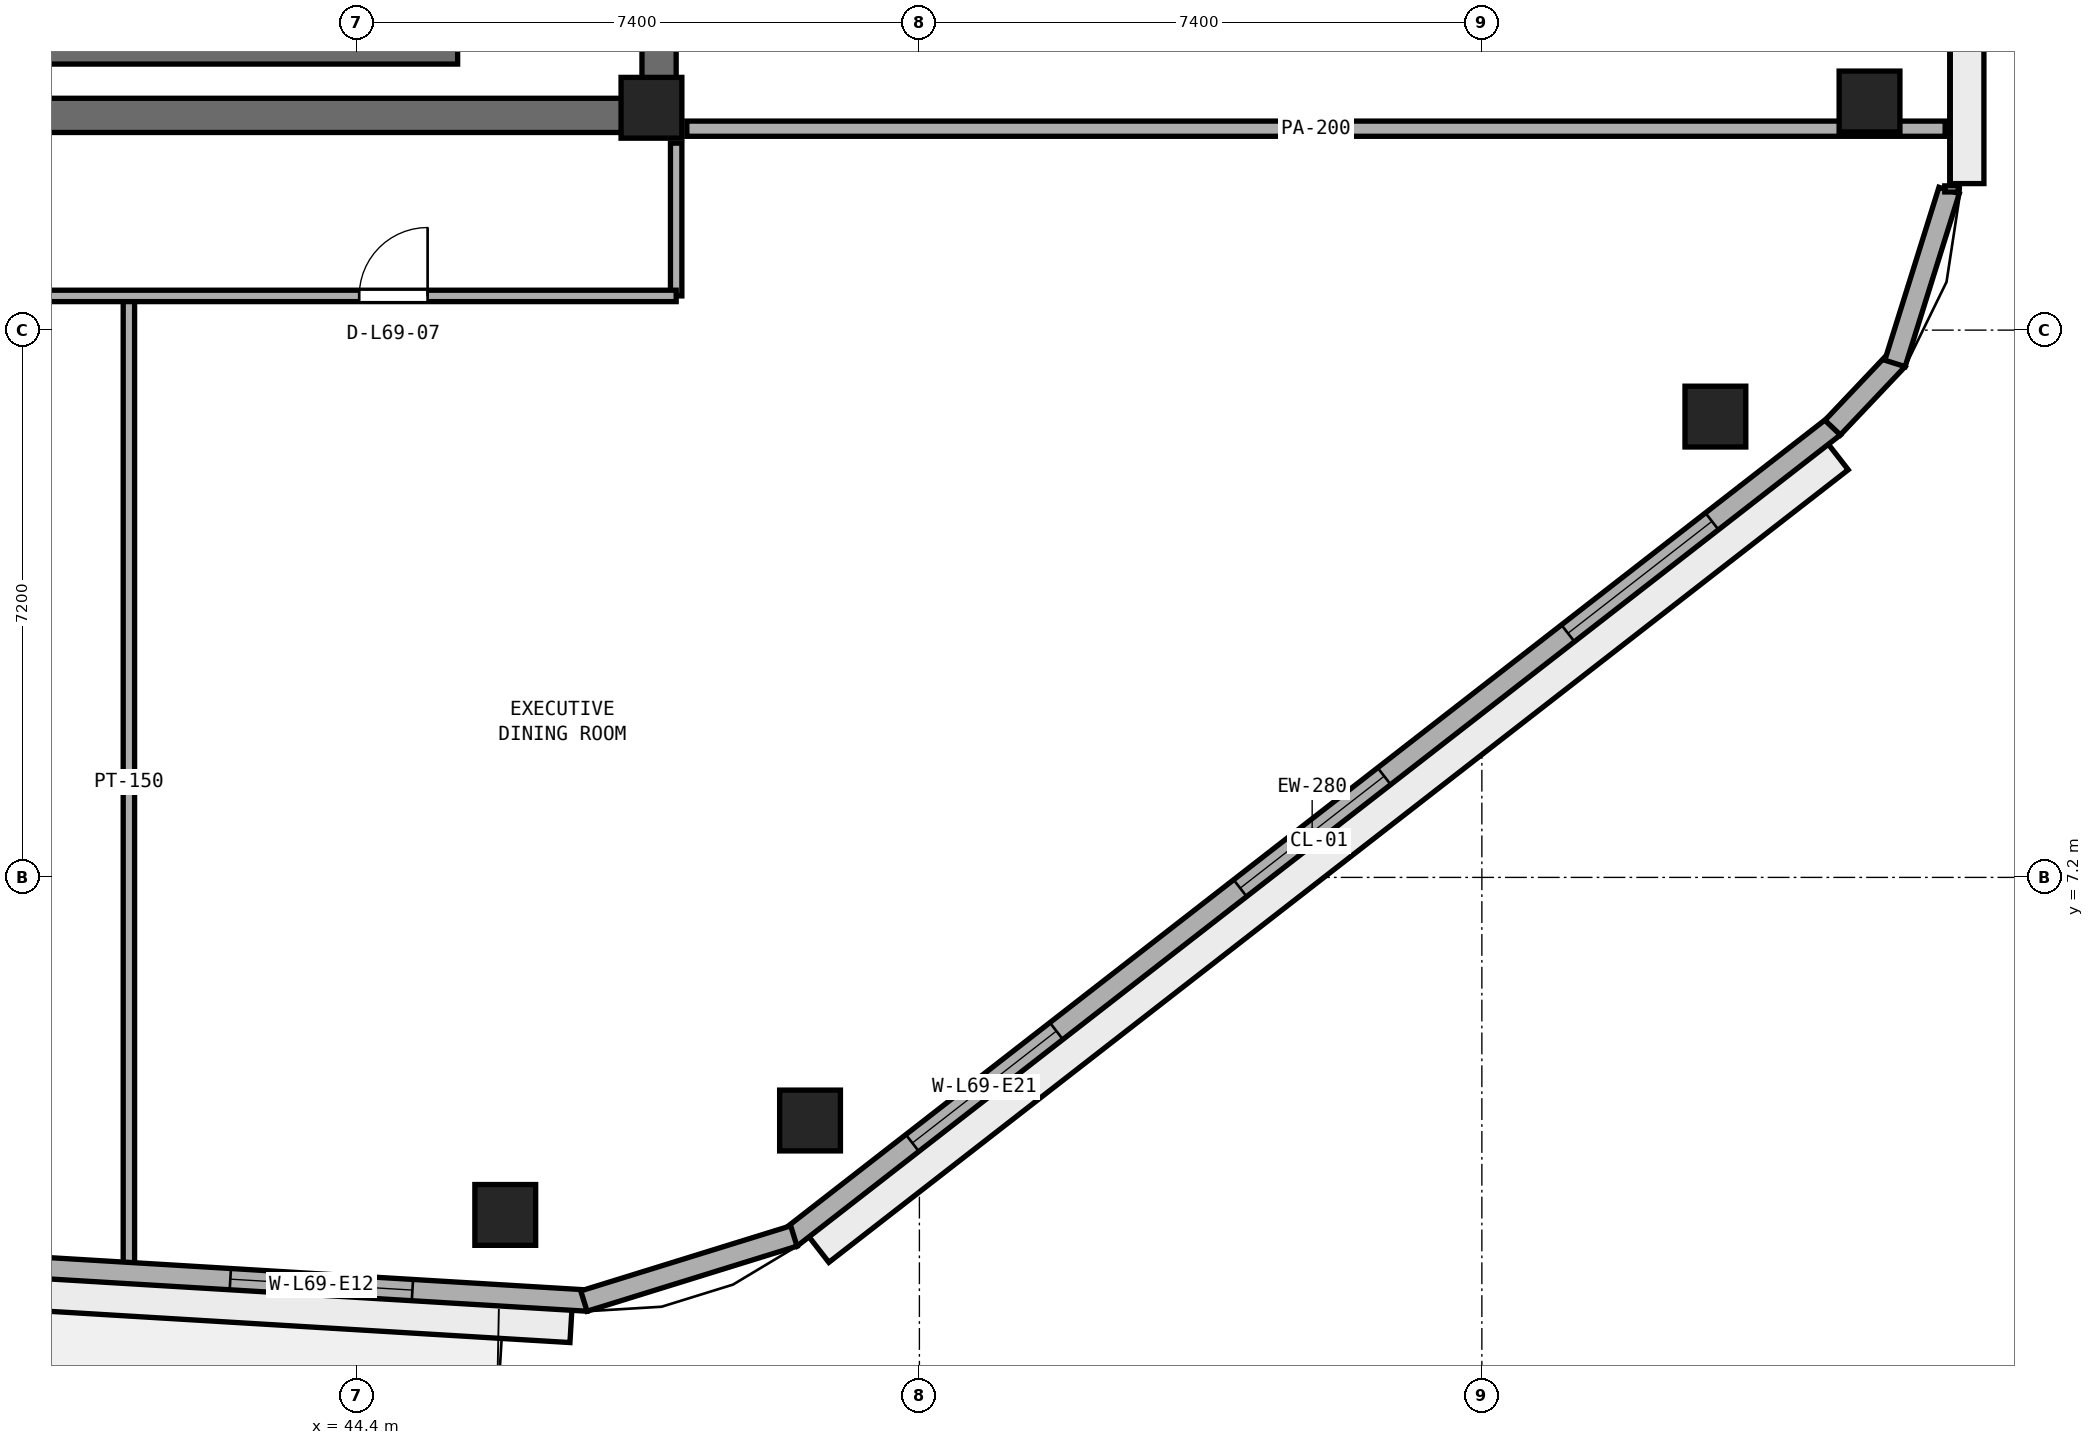
"""IFC4 building model, lengths in metres.
Left out: names, types, materials, properties, quantities, classifications, styles, units other than length and angle.
Written with IfcOpenShell. Run it as: python <this file> out.ifc"""

import sys

from ifc_helpers import new_model, si_unit, direction, frame, frame_2d, origin, origin_2d, place, context, subcontext, project, spatial, rectangle, extrude, element, fill, save


model = new_model("IFC4")
c1 = context("Model", 3, precision=1e-05, world=origin(), true_north=direction((0.0, 1.0)))
c2 = subcontext(c1, "Body", "Model", "MODEL_VIEW")
j1 = project(units=[si_unit("LENGTHUNIT", "METRE"), si_unit("PLANEANGLEUNIT", "RADIAN")], contexts=[c1])
p1 = place(None, origin())
s1 = spatial("IfcSite", under=j1, at=p1, CompositionType="ELEMENT")
p2 = place(p1, origin())
s2 = spatial("IfcBuilding", under=s1, at=p2, CompositionType="ELEMENT")
p3 = place(p2, frame((0.0, 0.0, 270.6)))
s3 = spatial("IfcBuildingStorey", under=s2, at=p3, CompositionType="ELEMENT", Elevation=270.6)
p4 = place(p3, frame((25.4, 17.225, 0.0), z_axis=(0.0, 0.0, 1.0), x_axis=(1.0, 0.0, 0.0)))
e1 = element("IfcWall", 1, at=p4, inside=s3, PredefinedType="SHEAR", context=c2, shape_type="SweptSolid", body=[
    extrude(rectangle(XDim=23.2, YDim=0.45, at=frame_2d((11.6, 0.0))), origin(), (0.0, 0.0, 1.0), 3.54),
])
p5 = place(p3, frame((48.375, 17.45, 0.0), z_axis=(0.0, 0.0, 1.0), x_axis=(0.0, 1.0, 0.0)))
e2 = element("IfcWall", 2, at=p5, inside=s3, PredefinedType="SHEAR", context=c2, shape_type="SweptSolid", body=[
    extrude(rectangle(XDim=15.5, YDim=0.45, at=frame_2d((7.75, 0.0))), origin(), (0.0, 0.0, 1.0), 3.54),
])
p6 = place(p5, frame((5.85, 0.0, 0.0)))
e3 = element("IfcOpeningElement", 3, at=p6, cuts=e2, PredefinedType="OPENING", context=c2, shape_type="SweptSolid", body=[
    extrude(rectangle(XDim=1.5, YDim=2.15, at=frame_2d((0.75, 1.075))), frame((0.0, 0.235, 0.0), z_axis=(0.0, -1.0, 0.0), x_axis=(1.0, 0.0, 0.0)), (0.0, 0.0, 1.0), 0.47),
])
p7 = place(p3, frame((48.275, 17.325, 0.0), z_axis=(0.0, 0.0, 1.0), x_axis=(1.0, 0.0, 0.0)))
e4 = element("IfcColumn", 4, at=p7, inside=s3, PredefinedType="PILASTER", context=c2, shape_type="SweptSolid", body=[
    extrude(rectangle(XDim=0.8, YDim=0.8, at=origin_2d()), origin(), (0.0, 0.0, 1.0), 3.8),
])
for number, where, z_axis, x_axis in (
    (5, (46.352, 2.76, 0.0), (0.0, 0.0, 1.0), (1.0, 0.0, 0.0)),
    (6, (50.361, 4.002, 0.0), (0.0, 0.0, 1.0), (1.0, 0.0, 0.0)),
    (7, (62.272, 13.262, 0.0), (0.0, 0.0, 1.0), (1.0, 0.0, 0.0)),
    (8, (64.3, 17.408, 0.0), (0.0, 0.0, 1.0), (1.0, 0.0, 0.0)),
):
    element("IfcColumn", number, at=place(p3, frame(where, z_axis=z_axis, x_axis=x_axis)), inside=s3, PredefinedType="COLUMN", context=c2, shape_type="SweptSolid", body=[
        extrude(rectangle(XDim=0.8, YDim=0.8, at=origin_2d()), origin(), (0.0, 0.0, 1.0), 3.8),
    ])
p8 = place(p3, frame((38.425, 18.025, 0.0), z_axis=(0.0, 0.0, 1.0), x_axis=(1.0, 0.0, 0.0)))
e9 = element("IfcWall", 9, at=p8, inside=s3, PredefinedType="SHEAR", context=c2, shape_type="SweptSolid", body=[
    extrude(rectangle(XDim=7.3, YDim=0.25, at=frame_2d((3.65, 0.0))), origin(), (0.0, 0.0, 1.0), 3.54),
])
p9 = place(p3, frame((48.6, 14.85, 0.0), z_axis=(0.0, 0.0, 1.0), x_axis=(0.0, 1.0, 0.0)))
e10 = element("IfcWall", 10, at=p9, inside=s3, PredefinedType="PARTITIONING", context=c2, shape_type="SweptSolid", body=[
    extrude(rectangle(XDim=2.01, YDim=0.15, at=frame_2d((1.005, 0.0))), origin(), (0.0, 0.0, 1.0), 2.19),
])
p10 = place(p3, frame((41.4, 2.06, 0.0), z_axis=(0.0, 0.0, 1.0), x_axis=(0.0, 1.0, 0.0)))
e11 = element("IfcWall", 11, at=p10, inside=s3, PredefinedType="PARTITIONING", context=c2, shape_type="SweptSolid", body=[
    extrude(rectangle(XDim=12.791, YDim=0.15, at=frame_2d((6.395, 0.0))), origin(), (0.0, 0.0, 1.0), 3.54),
])
p11 = place(p3, frame((23.25, 14.85, 0.0), z_axis=(0.0, 0.0, 1.0), x_axis=(1.0, 0.0, 0.0)))
e12 = element("IfcWall", 12, at=p11, inside=s3, PredefinedType="PARTITIONING", context=c2, shape_type="SweptSolid", body=[
    extrude(rectangle(XDim=25.35, YDim=0.15, at=frame_2d((12.675, 0.0))), origin(), (0.0, 0.0, 1.0), 3.54),
])
p12 = place(p11, frame((2.995, 0.0, 0.0)))
e13 = element("IfcOpeningElement", 13, at=p12, cuts=e12, PredefinedType="OPENING", context=c2, shape_type="SweptSolid", body=[
    extrude(rectangle(XDim=0.9, YDim=2.1, at=frame_2d((0.45, 1.05))), frame((0.0, 0.085, 0.0), z_axis=(0.0, -1.0, 0.0), x_axis=(1.0, 0.0, 0.0)), (0.0, 0.0, 1.0), 0.17),
])
p13 = place(p11, frame((11.95, 0.0, 0.0)))
e14 = element("IfcOpeningElement", 14, at=p13, cuts=e12, PredefinedType="OPENING", context=c2, shape_type="SweptSolid", body=[
    extrude(rectangle(XDim=0.9, YDim=2.1, at=frame_2d((0.45, 1.05))), frame((0.0, 0.085, 0.0), z_axis=(0.0, -1.0, 0.0), x_axis=(1.0, 0.0, 0.0)), (0.0, 0.0, 1.0), 0.17),
])
p14 = place(p11, frame((21.18, 0.0, 0.0)))
e15 = element("IfcOpeningElement", 15, at=p14, cuts=e12, PredefinedType="OPENING", context=c2, shape_type="SweptSolid", body=[
    extrude(rectangle(XDim=0.9, YDim=2.1, at=frame_2d((0.45, 1.05))), frame((0.0, 0.085, 0.0), z_axis=(0.0, -1.0, 0.0), x_axis=(1.0, 0.0, 0.0)), (0.0, 0.0, 1.0), 0.17),
])
p15 = place(p3, frame((48.74, 17.05, 0.0), z_axis=(0.0, 0.0, 1.0), x_axis=(1.0, 0.0, 0.0)))
e16 = element("IfcWall", 16, at=p15, inside=s3, PredefinedType="PARTITIONING", context=c2, shape_type="SweptSolid", body=[
    extrude(rectangle(XDim=16.555, YDim=0.2, at=frame_2d((8.277, 0.0))), origin(), (0.0, 0.0, 1.0), 2.19),
])
p16 = place(p3, frame((28.411, 2.774, 0.0), z_axis=(0.0, 0.0, 1.0), x_axis=(0.998203068368, -0.059921901676, 0.0)))
e17 = element("IfcWall", 17, at=p16, inside=s3, PredefinedType="STANDARD", context=c2, shape_type="SweptSolid", body=[
    extrude(rectangle(XDim=19.06, YDim=0.28, at=frame_2d((9.53, 0.0))), origin(), (0.0, 0.0, 1.0), 3.54),
])
p17 = place(p16, frame((8.98, 0.0, 0.0)))
e18 = element("IfcOpeningElement", 18, at=p17, cuts=e17, PredefinedType="OPENING", context=c2, shape_type="SweptSolid", body=[
    extrude(rectangle(XDim=1.1, YDim=2.2, at=frame_2d((0.55, 1.1))), frame((0.0, 0.15, 0.0), z_axis=(0.0, -1.0, 0.0), x_axis=(1.0, 0.0, 0.0)), (0.0, 0.0, 1.0), 0.3),
])
p18 = place(p16, frame((2.31, 0.0, 0.9)))
e19 = element("IfcOpeningElement", 19, at=p18, cuts=e17, PredefinedType="OPENING", context=c2, shape_type="SweptSolid", body=[
    extrude(rectangle(XDim=2.4, YDim=1.75, at=frame_2d((1.2, 0.875))), frame((0.0, 0.15, 0.0), z_axis=(0.0, -1.0, 0.0), x_axis=(1.0, 0.0, 0.0)), (0.0, 0.0, 1.0), 0.3),
])
p19 = place(p16, frame((14.35, 0.0, 0.9)))
e20 = element("IfcOpeningElement", 20, at=p19, cuts=e17, PredefinedType="OPENING", context=c2, shape_type="SweptSolid", body=[
    extrude(rectangle(XDim=2.4, YDim=1.75, at=frame_2d((1.2, 0.875))), frame((0.0, 0.15, 0.0), z_axis=(0.0, -1.0, 0.0), x_axis=(1.0, 0.0, 0.0)), (0.0, 0.0, 1.0), 0.3),
])
p20 = place(p3, frame((50.104, 2.459, 0.0), z_axis=(0.0, 0.0, 1.0), x_axis=(0.789464857485, 0.613795763097, 0.0)))
e21 = element("IfcWall", 21, at=p20, inside=s3, PredefinedType="STANDARD", context=c2, shape_type="SweptSolid", body=[
    extrude(rectangle(XDim=17.387, YDim=0.28, at=frame_2d((8.694, 0.0))), origin(), (0.0, 0.0, 1.0), 3.54),
])
p21 = place(p20, frame((2.031, 0.0, 0.9)))
e22 = element("IfcOpeningElement", 22, at=p21, cuts=e21, PredefinedType="OPENING", context=c2, shape_type="SweptSolid", body=[
    extrude(rectangle(XDim=2.4, YDim=1.75, at=frame_2d((1.2, 0.875))), frame((0.0, 0.15, 0.0), z_axis=(0.0, -1.0, 0.0), x_axis=(1.0, 0.0, 0.0)), (0.0, 0.0, 1.0), 0.3),
])
p22 = place(p20, frame((7.494, 0.0, 0.9)))
e23 = element("IfcOpeningElement", 23, at=p22, cuts=e21, PredefinedType="OPENING", context=c2, shape_type="SweptSolid", body=[
    extrude(rectangle(XDim=2.4, YDim=1.75, at=frame_2d((1.2, 0.875))), frame((0.0, 0.15, 0.0), z_axis=(0.0, -1.0, 0.0), x_axis=(1.0, 0.0, 0.0)), (0.0, 0.0, 1.0), 0.3),
])
p23 = place(p20, frame((12.956, 0.0, 0.9)))
e24 = element("IfcOpeningElement", 24, at=p23, cuts=e21, PredefinedType="OPENING", context=c2, shape_type="SweptSolid", body=[
    extrude(rectangle(XDim=2.4, YDim=1.75, at=frame_2d((1.2, 0.875))), frame((0.0, 0.15, 0.0), z_axis=(0.0, -1.0, 0.0), x_axis=(1.0, 0.0, 0.0)), (0.0, 0.0, 1.0), 0.3),
])
p24 = place(p3, frame((47.386, 1.626, 0.0), z_axis=(0.0, 0.0, 1.0), x_axis=(0.955189316149, 0.29599555793, 0.0)))
e25 = element("IfcWall", 25, at=p24, inside=s3, PredefinedType="STANDARD", context=c2, shape_type="SweptSolid", body=[
    extrude(rectangle(XDim=2.892, YDim=0.28, at=frame_2d((1.446, 0.0))), origin(), (0.0, 0.0, 1.0), 3.54),
])
p25 = place(p3, frame((63.815, 13.117, 0.0), z_axis=(0.0, 0.0, 1.0), x_axis=(0.687733716128, 0.725963040176, 0.0)))
e26 = element("IfcWall", 26, at=p25, inside=s3, PredefinedType="STANDARD", context=c2, shape_type="SweptSolid", body=[
    extrude(rectangle(XDim=1.239, YDim=0.28, at=frame_2d((0.62, 0.0))), origin(), (0.0, 0.0, 1.0), 3.54),
])
p26 = place(p3, frame((64.635, 13.962, 0.0), z_axis=(0.0, 0.0, 1.0), x_axis=(0.298601492944, 0.954377885542, 0.0)))
e27 = element("IfcWall", 27, at=p26, inside=s3, PredefinedType="STANDARD", context=c2, shape_type="SweptSolid", body=[
    extrude(rectangle(XDim=2.384, YDim=0.28, at=frame_2d((1.192, 0.0))), origin(), (0.0, 0.0, 1.0), 3.54),
])
p27 = place(p14, origin())
e28 = element("IfcDoor", 28, at=p27, inside=s3, OperationType="SINGLE_SWING_RIGHT", PredefinedType="DOOR", context=c2, shape_type="SweptSolid", body=[
    extrude(rectangle(XDim=0.9, YDim=2.1, at=frame_2d((0.45, 1.05))), frame((0.0, 0.025, 0.0), z_axis=(0.0, -1.0, 0.0), x_axis=(1.0, 0.0, 0.0)), (0.0, 0.0, 1.0), 0.05),
])
fill(e15, e28)
p28 = place(p19, origin())
e29 = element("IfcWindow", 29, at=p28, inside=s3, PartitioningType="SINGLE_PANEL", PredefinedType="WINDOW", context=c2, shape_type="SweptSolid", body=[
    extrude(rectangle(XDim=2.4, YDim=1.75, at=frame_2d((1.2, 0.875))), frame((0.0, 0.03, 0.0), z_axis=(0.0, -1.0, 0.0), x_axis=(1.0, 0.0, 0.0)), (0.0, 0.0, 1.0), 0.06),
])
fill(e20, e29)
p29 = place(p21, origin())
e30 = element("IfcWindow", 30, at=p29, inside=s3, PartitioningType="SINGLE_PANEL", PredefinedType="WINDOW", context=c2, shape_type="SweptSolid", body=[
    extrude(rectangle(XDim=2.4, YDim=1.75, at=frame_2d((1.2, 0.875))), frame((0.0, 0.03, 0.0), z_axis=(0.0, -1.0, 0.0), x_axis=(1.0, 0.0, 0.0)), (0.0, 0.0, 1.0), 0.06),
])
fill(e22, e30)
p30 = place(p22, origin())
e31 = element("IfcWindow", 31, at=p30, inside=s3, PartitioningType="SINGLE_PANEL", PredefinedType="WINDOW", context=c2, shape_type="SweptSolid", body=[
    extrude(rectangle(XDim=2.4, YDim=1.75, at=frame_2d((1.2, 0.875))), frame((0.0, 0.03, 0.0), z_axis=(0.0, -1.0, 0.0), x_axis=(1.0, 0.0, 0.0)), (0.0, 0.0, 1.0), 0.06),
])
fill(e23, e31)
p31 = place(p23, origin())
e32 = element("IfcWindow", 32, at=p31, inside=s3, PartitioningType="SINGLE_PANEL", PredefinedType="WINDOW", context=c2, shape_type="SweptSolid", body=[
    extrude(rectangle(XDim=2.4, YDim=1.75, at=frame_2d((1.2, 0.875))), frame((0.0, 0.03, 0.0), z_axis=(0.0, -1.0, 0.0), x_axis=(1.0, 0.0, 0.0)), (0.0, 0.0, 1.0), 0.06),
])
fill(e24, e32)
save(model, sys.argv[1])
